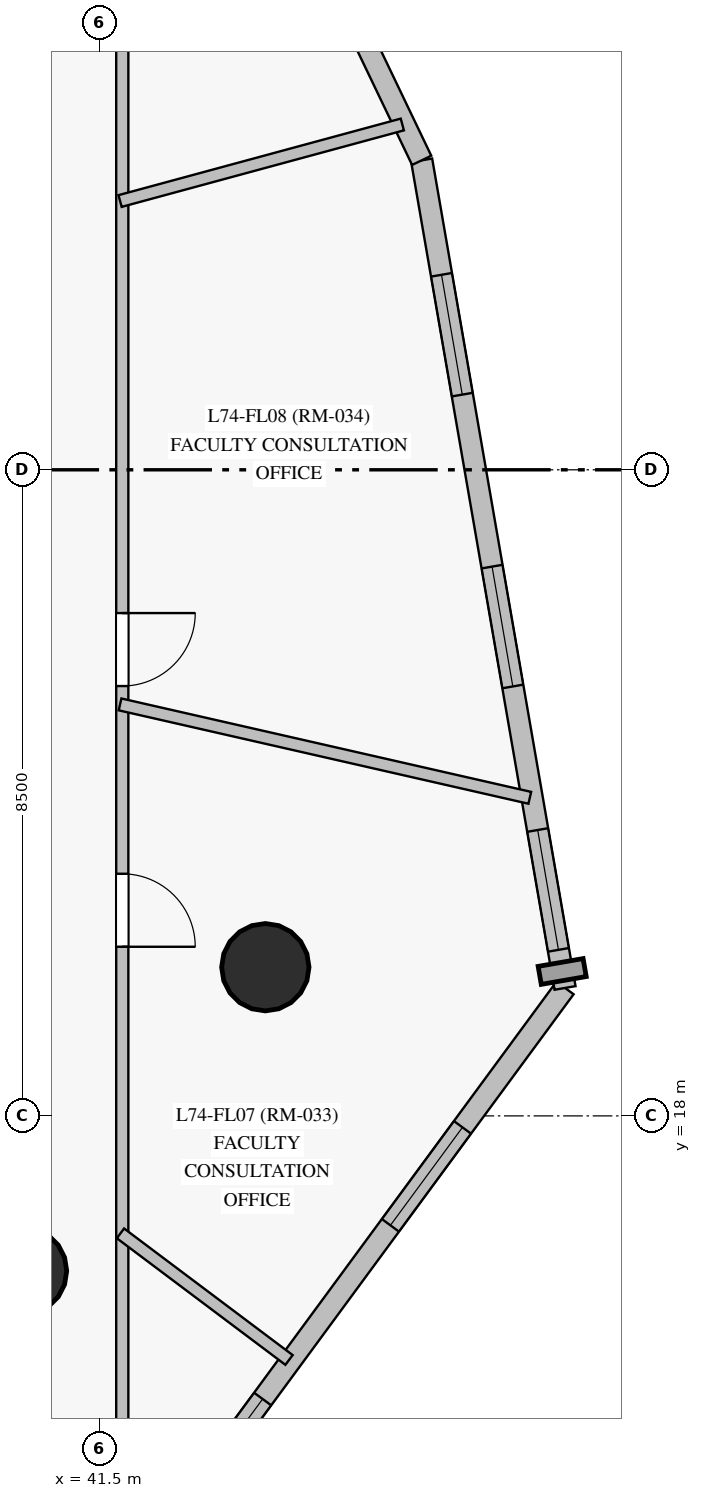
"""IFC4 building model, lengths in metres.
Left out: names, types, materials, properties, quantities, classifications, styles, units other than length and angle.
Written with IfcOpenShell. Run it as: python <this file> out.ifc"""

import sys

from ifc_helpers import new_model, si_unit, direction, frame, frame_2d, origin, origin_with_axes, origin_2d, place, context, subcontext, project, spatial, rectangle, circle, extrude, source, transform, mapped, element, fill, save


model = new_model("IFC4")
c1 = context("Model", 3, precision=1e-05, world=origin(), true_north=direction((0.0, 1.0)))
c2 = subcontext(c1, "Body", "Model", "MODEL_VIEW")
j1 = project(units=[si_unit("LENGTHUNIT", "METRE"), si_unit("PLANEANGLEUNIT", "RADIAN")], contexts=[c1])
p1 = place(None, origin())
s1 = spatial("IfcSite", under=j1, at=p1, CompositionType="ELEMENT")
p2 = place(p1, origin())
s2 = spatial("IfcBuilding", under=s1, at=p2, CompositionType="ELEMENT")
p3 = place(p2, frame((0.0, 0.0, 250.45)))
s3 = spatial("IfcBuildingStorey", under=s2, at=p3, CompositionType="ELEMENT", Elevation=250.45)
m1 = source(origin_with_axes(), c2, "Body", "SweptSolid", [
    extrude(circle(Radius=0.575, at=origin_2d()), origin(), (0.0, 0.0, 1.0), 3.05),
])
for number, where, z_axis, x_axis in (
    (1, (43.682, 19.956, 0.0), (0.0, 0.0, 1.0), (1.0, 0.0, 0.0)),
    (2, (40.494, 15.96, 0.0), (0.0, 0.0, 1.0), (1.0, 0.0, 0.0)),
):
    element("IfcColumn", number, at=place(p3, frame(where, z_axis=z_axis, x_axis=x_axis)), inside=s3, PredefinedType="COLUMN", context=c2, shape_type="MappedRepresentation", body=[
        mapped(m1, transform((0.0, 0.0, 0.0), scale=1.0)),
    ])
p4 = place(p3, frame((42.296, 12.439, 0.0), z_axis=(0.0, 0.0, 1.0), x_axis=(0.592559902782, 0.805526387907, 0.0)))
e3 = element("IfcWall", 3, at=p4, inside=s3, PredefinedType="SOLIDWALL", context=c2, shape_type="SweptSolid", body=[
    extrude(rectangle(XDim=8.993, YDim=0.28, at=frame_2d((4.497, 0.0))), origin(), (0.0, 0.0, 1.0), 2.85),
])
p5 = place(p4, frame((0.68, 0.0, 0.85)))
e4 = element("IfcOpeningElement", 4, at=p5, cuts=e3, PredefinedType="OPENING", context=c2, shape_type="SweptSolid", body=[
    extrude(rectangle(XDim=1.6, YDim=1.6, at=frame_2d((0.8, 0.8))), frame((0.0, 0.15, 0.0), z_axis=(0.0, -1.0, 0.0), x_axis=(1.0, 0.0, 0.0)), (0.0, 0.0, 1.0), 0.3),
])
p6 = place(p4, frame((5.116, 0.0, 0.85)))
e5 = element("IfcOpeningElement", 5, at=p6, cuts=e3, PredefinedType="OPENING", context=c2, shape_type="SweptSolid", body=[
    extrude(rectangle(XDim=1.6, YDim=1.6, at=frame_2d((0.8, 0.8))), frame((0.0, 0.15, 0.0), z_axis=(0.0, -1.0, 0.0), x_axis=(1.0, 0.0, 0.0)), (0.0, 0.0, 1.0), 0.3),
])
p7 = place(p3, frame((47.625, 19.683, 0.0), z_axis=(0.0, 0.0, 1.0), x_axis=(-0.170672613097, 0.985327792736, 0.0)))
e6 = element("IfcWall", 6, at=p7, inside=s3, PredefinedType="SOLIDWALL", context=c2, shape_type="SweptSolid", body=[
    extrude(rectangle(XDim=11.05, YDim=0.28, at=frame_2d((5.525, 0.0))), origin(), (0.0, 0.0, 1.0), 2.85),
])
p8 = place(p7, frame((0.509, 0.0, 0.85)))
e7 = element("IfcOpeningElement", 7, at=p8, cuts=e6, PredefinedType="OPENING", context=c2, shape_type="SweptSolid", body=[
    extrude(rectangle(XDim=1.6, YDim=1.6, at=frame_2d((0.8, 0.8))), frame((0.0, 0.15, 0.0), z_axis=(0.0, -1.0, 0.0), x_axis=(1.0, 0.0, 0.0)), (0.0, 0.0, 1.0), 0.3),
])
p9 = place(p7, frame((4.026, 0.0, 0.85)))
e8 = element("IfcOpeningElement", 8, at=p9, cuts=e6, PredefinedType="OPENING", context=c2, shape_type="SweptSolid", body=[
    extrude(rectangle(XDim=1.6, YDim=1.6, at=frame_2d((0.8, 0.8))), frame((0.0, 0.15, 0.0), z_axis=(0.0, -1.0, 0.0), x_axis=(1.0, 0.0, 0.0)), (0.0, 0.0, 1.0), 0.3),
])
p10 = place(p7, frame((7.922, 0.0, 0.85)))
e9 = element("IfcOpeningElement", 9, at=p10, cuts=e6, PredefinedType="OPENING", context=c2, shape_type="SweptSolid", body=[
    extrude(rectangle(XDim=1.6, YDim=1.6, at=frame_2d((0.8, 0.8))), frame((0.0, 0.15, 0.0), z_axis=(0.0, -1.0, 0.0), x_axis=(1.0, 0.0, 0.0)), (0.0, 0.0, 1.0), 0.3),
])
p11 = place(p3, frame((45.739, 30.571, 0.0), z_axis=(0.0, 0.0, 1.0), x_axis=(-0.432090063986, 0.901830458903, 0.0)))
e10 = element("IfcWall", 10, at=p11, inside=s3, PredefinedType="SOLIDWALL", context=c2, shape_type="SweptSolid", body=[
    extrude(rectangle(XDim=7.554, YDim=0.28, at=frame_2d((3.777, 0.0))), origin(), (0.0, 0.0, 1.0), 2.85),
])
p12 = place(p11, frame((3.218, 0.0, 0.85)))
e11 = element("IfcOpeningElement", 11, at=p12, cuts=e10, PredefinedType="OPENING", context=c2, shape_type="SweptSolid", body=[
    extrude(rectangle(XDim=1.6, YDim=1.6, at=frame_2d((0.8, 0.8))), frame((0.0, 0.15, 0.0), z_axis=(0.0, -1.0, 0.0), x_axis=(1.0, 0.0, 0.0)), (0.0, 0.0, 1.0), 0.3),
])
p13 = place(p3, frame((41.8, 33.45, 0.0), z_axis=(0.0, 0.0, 1.0), x_axis=(0.0, -1.0, 0.0)))
e12 = element("IfcWall", 12, at=p13, inside=s3, PredefinedType="PARTITIONING", context=c2, shape_type="SweptSolid", body=[
    extrude(rectangle(XDim=19.6, YDim=0.16, at=frame_2d((9.8, 0.0))), origin(), (0.0, 0.0, 1.0), 2.3),
])
p14 = place(p13, frame((12.265, 0.0, 0.0)))
e13 = element("IfcOpeningElement", 13, at=p14, cuts=e12, PredefinedType="OPENING", context=c2, shape_type="SweptSolid", body=[
    extrude(rectangle(XDim=0.96, YDim=2.15, at=frame_2d((0.48, 1.075))), frame((0.0, 0.09, 0.0), z_axis=(0.0, -1.0, 0.0), x_axis=(1.0, 0.0, 0.0)), (0.0, 0.0, 1.0), 0.18),
])
p15 = place(p13, frame((8.835, 0.0, 0.0)))
e14 = element("IfcOpeningElement", 14, at=p15, cuts=e12, PredefinedType="OPENING", context=c2, shape_type="SweptSolid", body=[
    extrude(rectangle(XDim=0.96, YDim=2.15, at=frame_2d((0.48, 1.075))), frame((0.0, 0.09, 0.0), z_axis=(0.0, -1.0, 0.0), x_axis=(1.0, 0.0, 0.0)), (0.0, 0.0, 1.0), 0.18),
])
p16 = place(p3, frame((41.771, 23.414, 0.0), z_axis=(0.0, 0.0, 1.0), x_axis=(0.974991250111, -0.222243250082, 0.0)))
e15 = element("IfcWall", 15, at=p16, inside=s3, PredefinedType="PARTITIONING", context=c2, shape_type="SweptSolid", body=[
    extrude(rectangle(XDim=5.529, YDim=0.16, at=frame_2d((2.764, 0.0))), origin(), (0.0, 0.0, 1.0), 2.85),
])
p17 = place(p3, frame((41.771, 30.036, 0.0), z_axis=(0.0, 0.0, 1.0), x_axis=(0.965147934971, 0.261704917077, 0.0)))
e16 = element("IfcWall", 16, at=p17, inside=s3, PredefinedType="PARTITIONING", context=c2, shape_type="SweptSolid", body=[
    extrude(rectangle(XDim=3.847, YDim=0.16, at=frame_2d((1.924, 0.0))), origin(), (0.0, 0.0, 1.0), 2.85),
])
p18 = place(p3, frame((41.776, 16.455, 0.0), z_axis=(0.0, 0.0, 1.0), x_axis=(0.799651310339, -0.60046463832, 0.0)))
e17 = element("IfcWall", 17, at=p18, inside=s3, PredefinedType="PARTITIONING", context=c2, shape_type="SweptSolid", body=[
    extrude(rectangle(XDim=2.774, YDim=0.16, at=frame_2d((1.387, 0.0))), origin(), (0.0, 0.0, 1.0), 2.85),
])
m2 = source(origin_with_axes(), c2, "Body", "SweptSolid", [
    extrude(rectangle(XDim=1.6, YDim=1.6, at=frame_2d((0.8, 0.8))), frame((0.0, 0.03, 0.0), z_axis=(0.0, -1.0, 0.0), x_axis=(1.0, 0.0, 0.0)), (0.0, 0.0, 1.0), 0.06),
])
p19 = place(p5, origin())
e18 = element("IfcWindow", 18, at=p19, inside=s3, PartitioningType="SINGLE_PANEL", PredefinedType="WINDOW", context=c2, shape_type="MappedRepresentation", body=[
    mapped(m2, transform((0.0, 0.0, 0.0), scale=1.0)),
])
fill(e4, e18)
p20 = place(p6, origin())
e19 = element("IfcWindow", 19, at=p20, inside=s3, PartitioningType="SINGLE_PANEL", PredefinedType="WINDOW", context=c2, shape_type="MappedRepresentation", body=[
    mapped(m2, transform((0.0, 0.0, 0.0), scale=1.0)),
])
fill(e5, e19)
p21 = place(p8, origin())
e20 = element("IfcWindow", 20, at=p21, inside=s3, PartitioningType="SINGLE_PANEL", PredefinedType="WINDOW", context=c2, shape_type="MappedRepresentation", body=[
    mapped(m2, transform((0.0, 0.0, 0.0), scale=1.0)),
])
fill(e7, e20)
p22 = place(p9, origin())
e21 = element("IfcWindow", 21, at=p22, inside=s3, PartitioningType="SINGLE_PANEL", PredefinedType="WINDOW", context=c2, shape_type="MappedRepresentation", body=[
    mapped(m2, transform((0.0, 0.0, 0.0), scale=1.0)),
])
fill(e8, e21)
p23 = place(p10, origin())
e22 = element("IfcWindow", 22, at=p23, inside=s3, PartitioningType="SINGLE_PANEL", PredefinedType="WINDOW", context=c2, shape_type="MappedRepresentation", body=[
    mapped(m2, transform((0.0, 0.0, 0.0), scale=1.0)),
])
fill(e9, e22)
m3 = source(origin_with_axes(), c2, "Body", "SweptSolid", [
    extrude(rectangle(XDim=0.96, YDim=2.15, at=frame_2d((0.48, 1.075))), frame((0.0, 0.025, 0.0), z_axis=(0.0, -1.0, 0.0), x_axis=(1.0, 0.0, 0.0)), (0.0, 0.0, 1.0), 0.05),
])
p24 = place(p14, origin())
e23 = element("IfcDoor", 23, at=p24, inside=s3, OperationType="SINGLE_SWING_RIGHT", PredefinedType="DOOR", context=c2, shape_type="MappedRepresentation", body=[
    mapped(m3, transform((0.0, 0.0, 0.0), scale=1.0)),
])
fill(e13, e23)
p25 = place(p15, origin())
e24 = element("IfcDoor", 24, at=p25, inside=s3, OperationType="SINGLE_SWING_LEFT", PredefinedType="DOOR", context=c2, shape_type="MappedRepresentation", body=[
    mapped(m3, transform((0.0, 0.0, 0.0), scale=1.0)),
])
fill(e14, e24)
save(model, sys.argv[1])
